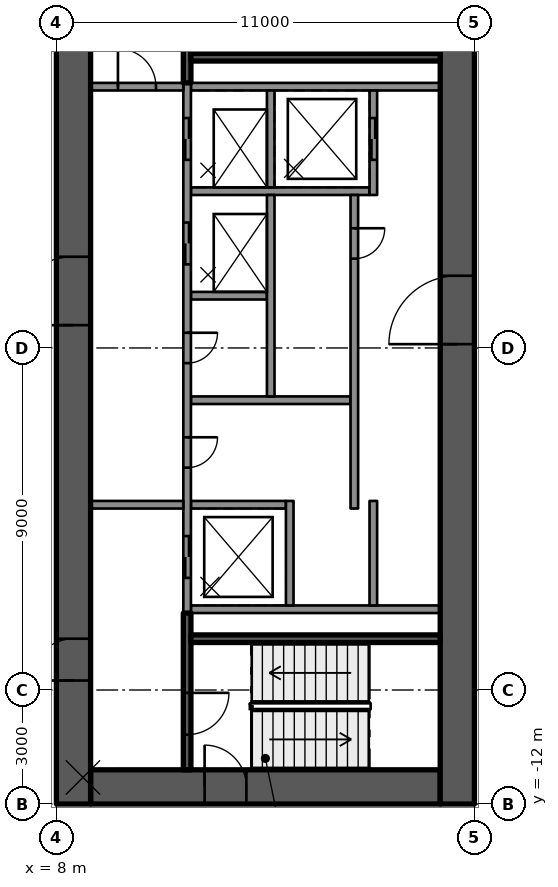
"""IFC4 building model, lengths in metres.
Left out: names, types, materials, properties, quantities, classifications, styles, units other than length and angle.
Written with IfcOpenShell. Run it as: python <this file> out.ifc"""

import sys

from ifc_helpers import new_model, si_unit, direction, frame, frame_2d, origin, place, context, subcontext, project, spatial, rectangle, extrude, element, fill, save


model = new_model("IFC4")
c1 = context("Model", 3, precision=1e-05, world=origin(), true_north=direction((0.0, 1.0)))
c2 = subcontext(c1, "Body", "Model", "MODEL_VIEW")
j1 = project(units=[si_unit("LENGTHUNIT", "METRE"), si_unit("PLANEANGLEUNIT", "RADIAN")], contexts=[c1])
p1 = place(None, origin())
s1 = spatial("IfcSite", under=j1, at=p1, CompositionType="ELEMENT")
p2 = place(p1, origin())
s2 = spatial("IfcBuilding", under=s1, at=p2, CompositionType="ELEMENT")
p3 = place(p2, frame((0.0, 0.0, 228.0)))
s3 = spatial("IfcBuildingStorey", under=s2, at=p3, CompositionType="ELEMENT", Elevation=228.0)
p4 = place(p3, frame((8.9, -11.55, 0.0), z_axis=(0.0, 0.0, 1.0), x_axis=(1.0, 0.0, 0.0)))
e1 = element("IfcWall", 1, at=p4, inside=s3, PredefinedType="SHEAR", context=c2, shape_type="SweptSolid", body=[
    extrude(rectangle(XDim=9.2, YDim=0.9, at=frame_2d((4.6, 0.0))), origin(), (0.0, 0.0, 1.0), 4.0),
])
p5 = place(p4, frame((3.0, 0.0, 0.0)))
e2 = element("IfcOpeningElement", 2, at=p5, cuts=e1, PredefinedType="OPENING", context=c2, shape_type="SweptSolid", body=[
    extrude(rectangle(XDim=1.1, YDim=2.1, at=frame_2d((0.55, 1.05))), frame((0.0, 0.46, 0.0), z_axis=(0.0, -1.0, 0.0), x_axis=(1.0, 0.0, 0.0)), (0.0, 0.0, 1.0), 0.92),
])
p6 = place(p3, frame((8.45, -12.0, 0.0), z_axis=(0.0, 0.0, 1.0), x_axis=(0.0, 1.0, 0.0)))
e3 = element("IfcWall", 3, at=p6, inside=s3, PredefinedType="SHEAR", context=c2, shape_type="SweptSolid", body=[
    extrude(rectangle(XDim=24.0, YDim=0.9, at=frame_2d((12.0, 0.0))), origin(), (0.0, 0.0, 1.0), 4.0),
])
p7 = place(p6, frame((12.6, 0.0, 0.0)))
e4 = element("IfcOpeningElement", 4, at=p7, cuts=e3, PredefinedType="OPENING", context=c2, shape_type="SweptSolid", body=[
    extrude(rectangle(XDim=1.8, YDim=2.1, at=frame_2d((0.9, 1.05))), frame((0.0, 0.46, 0.0), z_axis=(0.0, -1.0, 0.0), x_axis=(1.0, 0.0, 0.0)), (0.0, 0.0, 1.0), 0.92),
])
p8 = place(p6, frame((3.25, 0.0, 0.0)))
e5 = element("IfcOpeningElement", 5, at=p8, cuts=e3, PredefinedType="OPENING", context=c2, shape_type="SweptSolid", body=[
    extrude(rectangle(XDim=1.1, YDim=2.1, at=frame_2d((0.55, 1.05))), frame((0.0, 0.46, 0.0), z_axis=(0.0, -1.0, 0.0), x_axis=(1.0, 0.0, 0.0)), (0.0, 0.0, 1.0), 0.92),
])
p9 = place(p3, frame((18.55, -12.0, 0.0), z_axis=(0.0, 0.0, 1.0), x_axis=(0.0, 1.0, 0.0)))
e6 = element("IfcWall", 6, at=p9, inside=s3, PredefinedType="SHEAR", context=c2, shape_type="SweptSolid", body=[
    extrude(rectangle(XDim=24.0, YDim=0.9, at=frame_2d((12.0, 0.0))), origin(), (0.0, 0.0, 1.0), 4.0),
])
p10 = place(p9, frame((12.1, 0.0, 0.0)))
e7 = element("IfcOpeningElement", 7, at=p10, cuts=e6, PredefinedType="OPENING", context=c2, shape_type="SweptSolid", body=[
    extrude(rectangle(XDim=1.8, YDim=2.1, at=frame_2d((0.9, 1.05))), frame((0.0, 0.46, 0.0), z_axis=(0.0, -1.0, 0.0), x_axis=(1.0, 0.0, 0.0)), (0.0, 0.0, 1.0), 0.92),
])
for number, where, z_axis, x_axis in (
    (8, (11.54, -6.875, 0.0), (0.0, 0.0, 1.0), (1.0, 0.0, 0.0)),
    (9, (11.54, 6.875, 0.0), (0.0, 0.0, 1.0), (1.0, 0.0, 0.0)),
):
    element("IfcWall", number, at=place(p3, frame(where, z_axis=z_axis, x_axis=x_axis)), inside=s3, PredefinedType="SOLIDWALL", context=c2, shape_type="SweptSolid", body=[
        extrude(rectangle(XDim=6.56, YDim=0.2, at=frame_2d((3.28, 0.0))), origin(), (0.0, 0.0, 1.0), 3.59),
    ])
p11 = place(p3, frame((11.54, 4.125, 0.0), z_axis=(0.0, 0.0, 1.0), x_axis=(1.0, 0.0, 0.0)))
e10 = element("IfcWall", 10, at=p11, inside=s3, PredefinedType="SOLIDWALL", context=c2, shape_type="SweptSolid", body=[
    extrude(rectangle(XDim=4.7, YDim=0.2, at=frame_2d((2.35, 0.0))), origin(), (0.0, 0.0, 1.0), 3.59),
])
p12 = place(p3, frame((11.54, 1.375, 0.0), z_axis=(0.0, 0.0, 1.0), x_axis=(1.0, 0.0, 0.0)))
e11 = element("IfcWall", 11, at=p12, inside=s3, PredefinedType="SOLIDWALL", context=c2, shape_type="SweptSolid", body=[
    extrude(rectangle(XDim=2.0, YDim=0.2, at=frame_2d((1.0, 0.0))), origin(), (0.0, 0.0, 1.0), 3.59),
])
p13 = place(p3, frame((11.54, -1.375, 0.0), z_axis=(0.0, 0.0, 1.0), x_axis=(1.0, 0.0, 0.0)))
e12 = element("IfcWall", 12, at=p13, inside=s3, PredefinedType="SOLIDWALL", context=c2, shape_type="SweptSolid", body=[
    extrude(rectangle(XDim=4.2, YDim=0.2, at=frame_2d((2.1, 0.0))), origin(), (0.0, 0.0, 1.0), 3.59),
])
p14 = place(p3, frame((11.54, -4.125, 0.0), z_axis=(0.0, 0.0, 1.0), x_axis=(1.0, 0.0, 0.0)))
e13 = element("IfcWall", 13, at=p14, inside=s3, PredefinedType="SOLIDWALL", context=c2, shape_type="SweptSolid", body=[
    extrude(rectangle(XDim=2.5, YDim=0.2, at=frame_2d((1.25, 0.0))), origin(), (0.0, 0.0, 1.0), 3.59),
])
p15 = place(p3, frame((11.44, 6.975, 0.0), z_axis=(0.0, 0.0, 1.0), x_axis=(0.0, -1.0, 0.0)))
e14 = element("IfcWall", 14, at=p15, inside=s3, PredefinedType="SOLIDWALL", context=c2, shape_type="SweptSolid", body=[
    extrude(rectangle(XDim=13.95, YDim=0.2, at=frame_2d((6.975, 0.0))), origin(), (0.0, 0.0, 1.0), 3.59),
])
p16 = place(p15, frame((0.925, 0.0, 0.0)))
e15 = element("IfcOpeningElement", 15, at=p16, cuts=e14, PredefinedType="OPENING", context=c2, shape_type="SweptSolid", body=[
    extrude(rectangle(XDim=1.1, YDim=2.1, at=frame_2d((0.55, 1.05))), frame((0.0, 0.11, 0.0), z_axis=(0.0, -1.0, 0.0), x_axis=(1.0, 0.0, 0.0)), (0.0, 0.0, 1.0), 0.22),
])
p17 = place(p15, frame((3.675, 0.0, 0.0)))
e16 = element("IfcOpeningElement", 16, at=p17, cuts=e14, PredefinedType="OPENING", context=c2, shape_type="SweptSolid", body=[
    extrude(rectangle(XDim=1.1, YDim=2.1, at=frame_2d((0.55, 1.05))), frame((0.0, 0.11, 0.0), z_axis=(0.0, -1.0, 0.0), x_axis=(1.0, 0.0, 0.0)), (0.0, 0.0, 1.0), 0.22),
])
p18 = place(p15, frame((11.925, 0.0, 0.0)))
e17 = element("IfcOpeningElement", 17, at=p18, cuts=e14, PredefinedType="OPENING", context=c2, shape_type="SweptSolid", body=[
    extrude(rectangle(XDim=1.1, YDim=2.1, at=frame_2d((0.55, 1.05))), frame((0.0, 0.11, 0.0), z_axis=(0.0, -1.0, 0.0), x_axis=(1.0, 0.0, 0.0)), (0.0, 0.0, 1.0), 0.22),
])
p19 = place(p15, frame((6.575, 0.0, 0.0)))
e18 = element("IfcOpeningElement", 18, at=p19, cuts=e14, PredefinedType="OPENING", context=c2, shape_type="SweptSolid", body=[
    extrude(rectangle(XDim=0.8, YDim=2.1, at=frame_2d((0.4, 1.05))), frame((0.0, 0.11, 0.0), z_axis=(0.0, -1.0, 0.0), x_axis=(1.0, 0.0, 0.0)), (0.0, 0.0, 1.0), 0.22),
])
p20 = place(p15, frame((9.325, 0.0, 0.0)))
e19 = element("IfcOpeningElement", 19, at=p20, cuts=e14, PredefinedType="OPENING", context=c2, shape_type="SweptSolid", body=[
    extrude(rectangle(XDim=0.8, YDim=2.1, at=frame_2d((0.4, 1.05))), frame((0.0, 0.11, 0.0), z_axis=(0.0, -1.0, 0.0), x_axis=(1.0, 0.0, 0.0)), (0.0, 0.0, 1.0), 0.22),
])
p21 = place(p3, frame((13.64, 6.775, 0.0), z_axis=(0.0, 0.0, 1.0), x_axis=(0.0, -1.0, 0.0)))
e20 = element("IfcWall", 20, at=p21, inside=s3, PredefinedType="SOLIDWALL", context=c2, shape_type="SweptSolid", body=[
    extrude(rectangle(XDim=2.55, YDim=0.2, at=frame_2d((1.275, 0.0))), origin(), (0.0, 0.0, 1.0), 3.59),
])
p22 = place(p3, frame((13.64, 4.025, 0.0), z_axis=(0.0, 0.0, 1.0), x_axis=(0.0, -1.0, 0.0)))
e21 = element("IfcWall", 21, at=p22, inside=s3, PredefinedType="SOLIDWALL", context=c2, shape_type="SweptSolid", body=[
    extrude(rectangle(XDim=5.3, YDim=0.2, at=frame_2d((2.65, 0.0))), origin(), (0.0, 0.0, 1.0), 3.59),
])
p23 = place(p3, frame((14.14, -4.025, 0.0), z_axis=(0.0, 0.0, 1.0), x_axis=(0.0, -1.0, 0.0)))
e22 = element("IfcWall", 22, at=p23, inside=s3, PredefinedType="SOLIDWALL", context=c2, shape_type="SweptSolid", body=[
    extrude(rectangle(XDim=2.75, YDim=0.2, at=frame_2d((1.375, 0.0))), origin(), (0.0, 0.0, 1.0), 3.59),
])
p24 = place(p3, frame((16.34, 6.775, 0.0), z_axis=(0.0, 0.0, 1.0), x_axis=(0.0, -1.0, 0.0)))
e23 = element("IfcWall", 23, at=p24, inside=s3, PredefinedType="SOLIDWALL", context=c2, shape_type="SweptSolid", body=[
    extrude(rectangle(XDim=2.75, YDim=0.2, at=frame_2d((1.375, 0.0))), origin(), (0.0, 0.0, 1.0), 3.59),
])
p25 = place(p24, frame((0.725, 0.0, 0.0)))
e24 = element("IfcOpeningElement", 24, at=p25, cuts=e23, PredefinedType="OPENING", context=c2, shape_type="SweptSolid", body=[
    extrude(rectangle(XDim=1.1, YDim=2.1, at=frame_2d((0.55, 1.05))), frame((0.0, 0.11, 0.0), z_axis=(0.0, -1.0, 0.0), x_axis=(1.0, 0.0, 0.0)), (0.0, 0.0, 1.0), 0.22),
])
p26 = place(p3, frame((15.84, 4.025, 0.0), z_axis=(0.0, 0.0, 1.0), x_axis=(0.0, -1.0, 0.0)))
e25 = element("IfcWall", 25, at=p26, inside=s3, PredefinedType="SOLIDWALL", context=c2, shape_type="SweptSolid", body=[
    extrude(rectangle(XDim=8.25, YDim=0.2, at=frame_2d((4.125, 0.0))), origin(), (0.0, 0.0, 1.0), 3.59),
])
p27 = place(p26, frame((0.875, 0.0, 0.0)))
e26 = element("IfcOpeningElement", 26, at=p27, cuts=e25, PredefinedType="OPENING", context=c2, shape_type="SweptSolid", body=[
    extrude(rectangle(XDim=0.8, YDim=2.1, at=frame_2d((0.4, 1.05))), frame((0.0, 0.11, 0.0), z_axis=(0.0, -1.0, 0.0), x_axis=(1.0, 0.0, 0.0)), (0.0, 0.0, 1.0), 0.22),
])
p28 = place(p3, frame((16.34, -4.025, 0.0), z_axis=(0.0, 0.0, 1.0), x_axis=(0.0, -1.0, 0.0)))
e27 = element("IfcWall", 27, at=p28, inside=s3, PredefinedType="SOLIDWALL", context=c2, shape_type="SweptSolid", body=[
    extrude(rectangle(XDim=2.75, YDim=0.2, at=frame_2d((1.375, 0.0))), origin(), (0.0, 0.0, 1.0), 3.59),
])
p29 = place(p3, frame((11.44, -6.975, 0.0), z_axis=(0.0, 0.0, 1.0), x_axis=(0.0, -1.0, 0.0)))
e28 = element("IfcWall", 28, at=p29, inside=s3, PredefinedType="SOLIDWALL", context=c2, shape_type="SweptSolid", body=[
    extrude(rectangle(XDim=4.125, YDim=0.2, at=frame_2d((2.062, 0.0))), origin(), (0.0, 0.0, 1.0), 3.59),
])
p30 = place(p29, frame((2.1, 0.0, 0.0)))
e29 = element("IfcOpeningElement", 29, at=p30, cuts=e28, PredefinedType="OPENING", context=c2, shape_type="SweptSolid", body=[
    extrude(rectangle(XDim=1.1, YDim=2.1, at=frame_2d((0.55, 1.05))), frame((0.0, 0.11, 0.0), z_axis=(0.0, -1.0, 0.0), x_axis=(1.0, 0.0, 0.0)), (0.0, 0.0, 1.0), 0.22),
])
p31 = place(p3, frame((11.54, -7.65, 0.0), z_axis=(0.0, 0.0, 1.0), x_axis=(1.0, 0.0, 0.0)))
e30 = element("IfcWall", 30, at=p31, inside=s3, PredefinedType="SOLIDWALL", context=c2, shape_type="SweptSolid", body=[
    extrude(rectangle(XDim=6.56, YDim=0.2, at=frame_2d((3.28, 0.0))), origin(), (0.0, 0.0, 1.0), 3.59),
])
p32 = place(p3, frame((11.44, 11.1, 0.0), z_axis=(0.0, 0.0, 1.0), x_axis=(0.0, -1.0, 0.0)))
e31 = element("IfcWall", 31, at=p32, inside=s3, PredefinedType="SOLIDWALL", context=c2, shape_type="SweptSolid", body=[
    extrude(rectangle(XDim=4.125, YDim=0.2, at=frame_2d((2.062, 0.0))), origin(), (0.0, 0.0, 1.0), 3.59),
])
p33 = place(p3, frame((11.54, 7.65, 0.0), z_axis=(0.0, 0.0, 1.0), x_axis=(1.0, 0.0, 0.0)))
e32 = element("IfcWall", 32, at=p33, inside=s3, PredefinedType="SOLIDWALL", context=c2, shape_type="SweptSolid", body=[
    extrude(rectangle(XDim=6.56, YDim=0.2, at=frame_2d((3.28, 0.0))), origin(), (0.0, 0.0, 1.0), 3.59),
])
p34 = place(p3, frame((8.9, -4.125, 0.0), z_axis=(0.0, 0.0, 1.0), x_axis=(1.0, 0.0, 0.0)))
e33 = element("IfcWall", 33, at=p34, inside=s3, PredefinedType="PARTITIONING", context=c2, shape_type="SweptSolid", body=[
    extrude(rectangle(XDim=2.44, YDim=0.2, at=frame_2d((1.22, 0.0))), origin(), (0.0, 0.0, 1.0), 3.59),
])
p35 = place(p3, frame((8.9, 6.875, 0.0), z_axis=(0.0, 0.0, 1.0), x_axis=(1.0, 0.0, 0.0)))
e34 = element("IfcWall", 34, at=p35, inside=s3, PredefinedType="PARTITIONING", context=c2, shape_type="SweptSolid", body=[
    extrude(rectangle(XDim=2.44, YDim=0.2, at=frame_2d((1.22, 0.0))), origin(), (0.0, 0.0, 1.0), 3.59),
])
p36 = place(p35, frame((0.72, 0.0, 0.0)))
e35 = element("IfcOpeningElement", 35, at=p36, cuts=e34, PredefinedType="OPENING", context=c2, shape_type="SweptSolid", body=[
    extrude(rectangle(XDim=1.0, YDim=2.1, at=frame_2d((0.5, 1.05))), frame((0.0, 0.11, 0.0), z_axis=(0.0, -1.0, 0.0), x_axis=(1.0, 0.0, 0.0)), (0.0, 0.0, 1.0), 0.22),
])
p37 = place(p16, origin())
e36 = element("IfcDoor", 36, at=p37, inside=s3, OperationType="DOUBLE_DOOR_SLIDING", PredefinedType="DOOR", context=c2, shape_type="SweptSolid", body=[
    extrude(rectangle(XDim=1.1, YDim=2.1, at=frame_2d((0.55, 1.05))), frame((0.0, 0.025, 0.0), z_axis=(0.0, -1.0, 0.0), x_axis=(1.0, 0.0, 0.0)), (0.0, 0.0, 1.0), 0.05),
])
fill(e15, e36)
p38 = place(p25, origin())
e37 = element("IfcDoor", 37, at=p38, inside=s3, OperationType="DOUBLE_DOOR_SLIDING", PredefinedType="DOOR", context=c2, shape_type="SweptSolid", body=[
    extrude(rectangle(XDim=1.1, YDim=2.1, at=frame_2d((0.55, 1.05))), frame((0.0, 0.025, 0.0), z_axis=(0.0, -1.0, 0.0), x_axis=(1.0, 0.0, 0.0)), (0.0, 0.0, 1.0), 0.05),
])
fill(e24, e37)
p39 = place(p17, origin())
e38 = element("IfcDoor", 38, at=p39, inside=s3, OperationType="DOUBLE_DOOR_SLIDING", PredefinedType="DOOR", context=c2, shape_type="SweptSolid", body=[
    extrude(rectangle(XDim=1.1, YDim=2.1, at=frame_2d((0.55, 1.05))), frame((0.0, 0.025, 0.0), z_axis=(0.0, -1.0, 0.0), x_axis=(1.0, 0.0, 0.0)), (0.0, 0.0, 1.0), 0.05),
])
fill(e16, e38)
p40 = place(p18, origin())
e39 = element("IfcDoor", 39, at=p40, inside=s3, OperationType="DOUBLE_DOOR_SLIDING", PredefinedType="DOOR", context=c2, shape_type="SweptSolid", body=[
    extrude(rectangle(XDim=1.1, YDim=2.1, at=frame_2d((0.55, 1.05))), frame((0.0, 0.025, 0.0), z_axis=(0.0, -1.0, 0.0), x_axis=(1.0, 0.0, 0.0)), (0.0, 0.0, 1.0), 0.05),
])
fill(e17, e39)
p41 = place(p27, origin())
e40 = element("IfcDoor", 40, at=p41, inside=s3, OperationType="SINGLE_SWING_LEFT", PredefinedType="DOOR", context=c2, shape_type="SweptSolid", body=[
    extrude(rectangle(XDim=0.8, YDim=2.1, at=frame_2d((0.4, 1.05))), frame((0.0, 0.025, 0.0), z_axis=(0.0, -1.0, 0.0), x_axis=(1.0, 0.0, 0.0)), (0.0, 0.0, 1.0), 0.05),
])
fill(e26, e40)
p42 = place(p19, origin())
e41 = element("IfcDoor", 41, at=p42, inside=s3, OperationType="SINGLE_SWING_LEFT", PredefinedType="DOOR", context=c2, shape_type="SweptSolid", body=[
    extrude(rectangle(XDim=0.8, YDim=2.1, at=frame_2d((0.4, 1.05))), frame((0.0, 0.025, 0.0), z_axis=(0.0, -1.0, 0.0), x_axis=(1.0, 0.0, 0.0)), (0.0, 0.0, 1.0), 0.05),
])
fill(e18, e41)
p43 = place(p20, origin())
e42 = element("IfcDoor", 42, at=p43, inside=s3, OperationType="SINGLE_SWING_LEFT", PredefinedType="DOOR", context=c2, shape_type="SweptSolid", body=[
    extrude(rectangle(XDim=0.8, YDim=2.1, at=frame_2d((0.4, 1.05))), frame((0.0, 0.025, 0.0), z_axis=(0.0, -1.0, 0.0), x_axis=(1.0, 0.0, 0.0)), (0.0, 0.0, 1.0), 0.05),
])
fill(e19, e42)
p44 = place(p7, origin())
e43 = element("IfcDoor", 43, at=p44, inside=s3, OperationType="SINGLE_SWING_RIGHT", PredefinedType="DOOR", context=c2, shape_type="SweptSolid", body=[
    extrude(rectangle(XDim=1.8, YDim=2.1, at=frame_2d((0.9, 1.05))), frame((0.0, 0.025, 0.0), z_axis=(0.0, -1.0, 0.0), x_axis=(1.0, 0.0, 0.0)), (0.0, 0.0, 1.0), 0.05),
])
fill(e4, e43)
p45 = place(p10, origin())
e44 = element("IfcDoor", 44, at=p45, inside=s3, OperationType="SINGLE_SWING_RIGHT", PredefinedType="DOOR", context=c2, shape_type="SweptSolid", body=[
    extrude(rectangle(XDim=1.8, YDim=2.1, at=frame_2d((0.9, 1.05))), frame((0.0, 0.025, 0.0), z_axis=(0.0, -1.0, 0.0), x_axis=(1.0, 0.0, 0.0)), (0.0, 0.0, 1.0), 0.05),
])
fill(e7, e44)
p46 = place(p8, origin())
e45 = element("IfcDoor", 45, at=p46, inside=s3, OperationType="SINGLE_SWING_LEFT", PredefinedType="DOOR", context=c2, shape_type="SweptSolid", body=[
    extrude(rectangle(XDim=1.1, YDim=2.1, at=frame_2d((0.55, 1.05))), frame((0.0, 0.025, 0.0), z_axis=(0.0, -1.0, 0.0), x_axis=(1.0, 0.0, 0.0)), (0.0, 0.0, 1.0), 0.05),
])
fill(e5, e45)
p47 = place(p5, origin())
e46 = element("IfcDoor", 46, at=p47, inside=s3, OperationType="SINGLE_SWING_LEFT", PredefinedType="DOOR", context=c2, shape_type="SweptSolid", body=[
    extrude(rectangle(XDim=1.1, YDim=2.1, at=frame_2d((0.55, 1.05))), frame((0.0, 0.025, 0.0), z_axis=(0.0, -1.0, 0.0), x_axis=(1.0, 0.0, 0.0)), (0.0, 0.0, 1.0), 0.05),
])
fill(e2, e46)
p48 = place(p30, origin())
e47 = element("IfcDoor", 47, at=p48, inside=s3, OperationType="SINGLE_SWING_RIGHT", PredefinedType="DOOR", context=c2, shape_type="SweptSolid", body=[
    extrude(rectangle(XDim=1.1, YDim=2.1, at=frame_2d((0.55, 1.05))), frame((0.0, 0.025, 0.0), z_axis=(0.0, -1.0, 0.0), x_axis=(1.0, 0.0, 0.0)), (0.0, 0.0, 1.0), 0.05),
])
fill(e29, e47)
p49 = place(p36, origin())
e48 = element("IfcDoor", 48, at=p49, inside=s3, OperationType="SINGLE_SWING_RIGHT", PredefinedType="DOOR", context=c2, shape_type="SweptSolid", body=[
    extrude(rectangle(XDim=1.0, YDim=2.1, at=frame_2d((0.5, 1.05))), frame((0.0, 0.025, 0.0), z_axis=(0.0, -1.0, 0.0), x_axis=(1.0, 0.0, 0.0)), (0.0, 0.0, 1.0), 0.05),
])
fill(e35, e48)
save(model, sys.argv[1])
